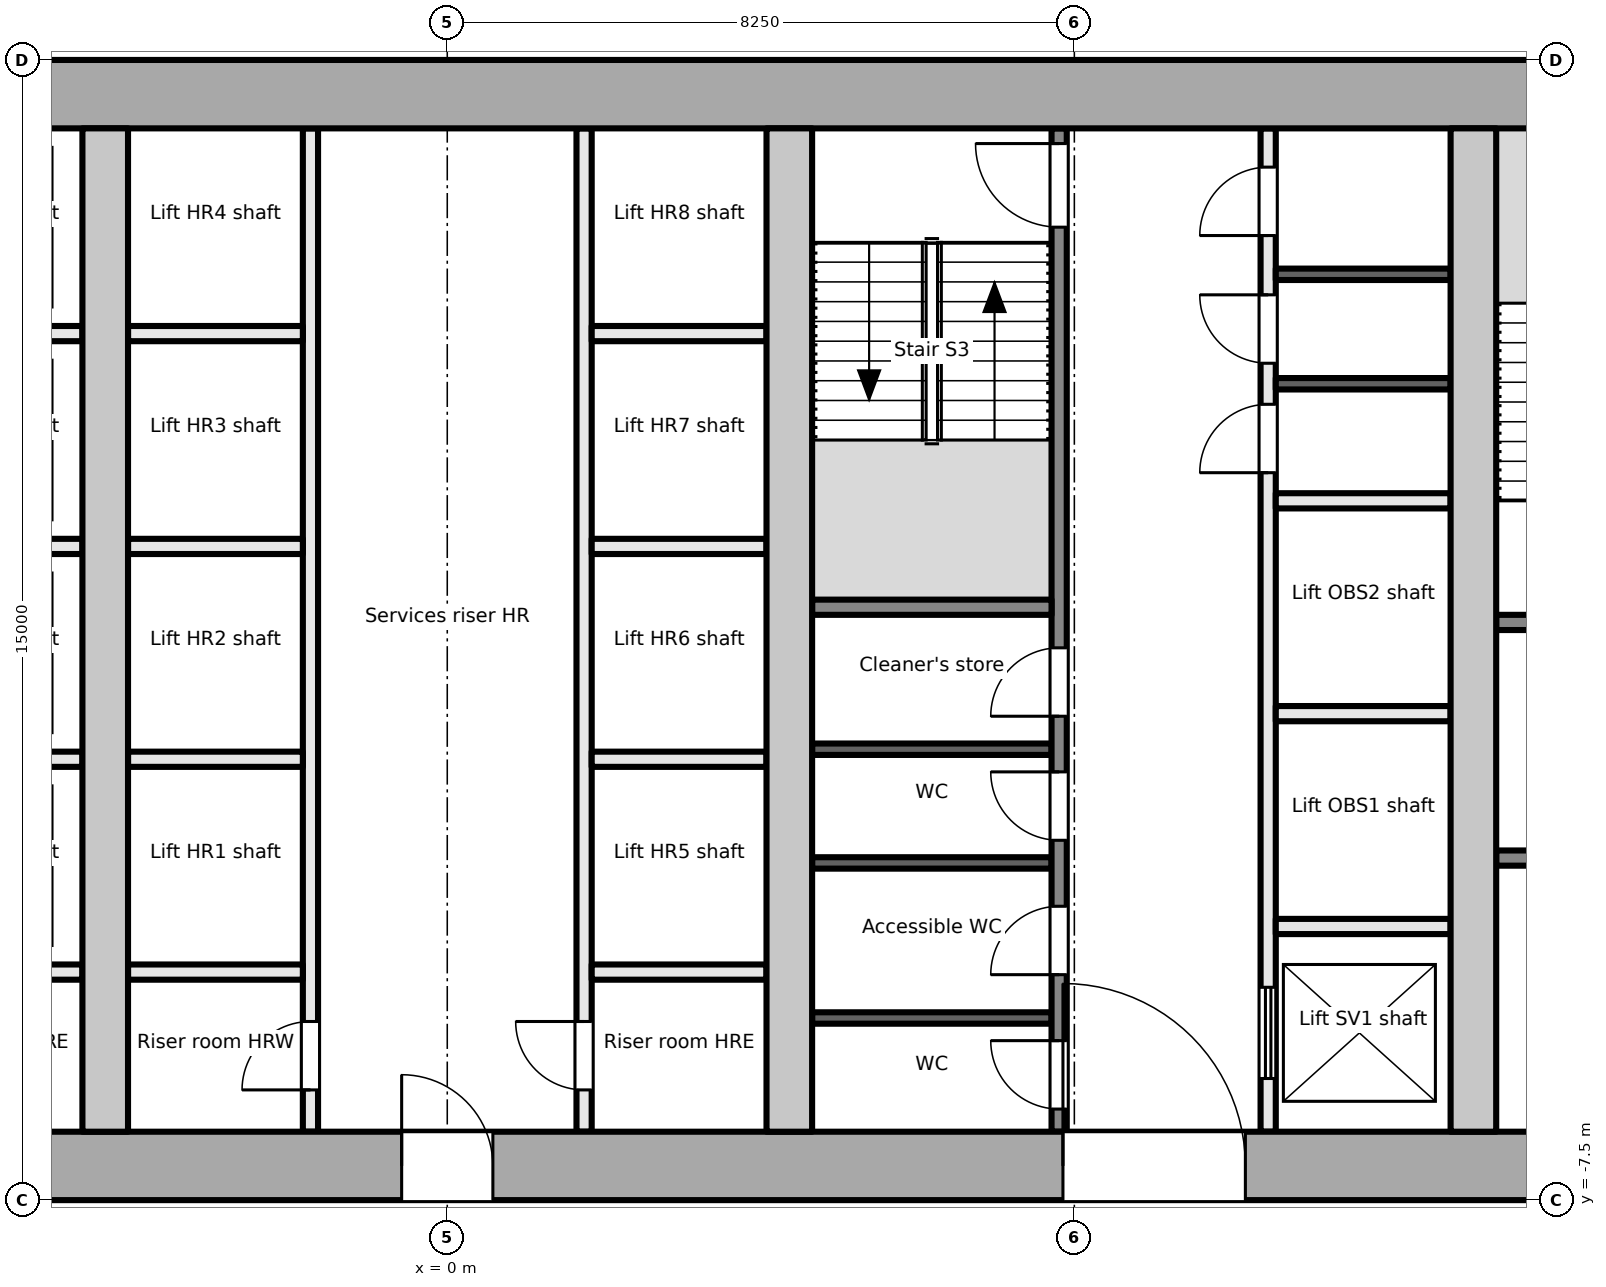
"""IFC4 building model, lengths in metres.
Left out: names, types, materials, properties, quantities, classifications, styles, units other than length and angle.
Written with IfcOpenShell. Run it as: python <this file> out.ifc"""

import sys

from ifc_helpers import new_model, si_unit, direction, frame, frame_2d, origin, place, context, subcontext, project, spatial, rectangle, extrude, element, fill, save


model = new_model("IFC4")
c1 = context("Model", 3, precision=1e-05, world=origin(), true_north=direction((0.0, 1.0)))
c2 = subcontext(c1, "Body", "Model", "MODEL_VIEW")
j1 = project(units=[si_unit("LENGTHUNIT", "METRE"), si_unit("PLANEANGLEUNIT", "RADIAN")], contexts=[c1])
p1 = place(None, origin())
s1 = spatial("IfcSite", under=j1, at=p1, CompositionType="ELEMENT")
p2 = place(p1, origin())
s2 = spatial("IfcBuilding", under=s1, at=p2, CompositionType="ELEMENT")
p3 = place(p2, frame((0.0, 0.0, 65.2)))
s3 = spatial("IfcBuildingStorey", under=s2, at=p3, CompositionType="ELEMENT", Elevation=65.2)
p4 = place(p3, frame((-18.0, -7.05, -0.2), z_axis=(0.0, 0.0, 1.0), x_axis=(1.0, 0.0, 0.0)))
e1 = element("IfcWall", 1, at=p4, inside=s3, PredefinedType="SHEAR", context=c2, shape_type="SweptSolid", body=[
    extrude(rectangle(XDim=36.0, YDim=0.9, at=frame_2d((18.0, 0.0))), origin(), (0.0, 0.0, 1.0), 4.1),
])
p5 = place(p4, frame((7.8, 0.0, 0.2)))
e2 = element("IfcOpeningElement", 2, at=p5, cuts=e1, PredefinedType="OPENING", context=c2, shape_type="SweptSolid", body=[
    extrude(rectangle(XDim=2.4, YDim=2.1, at=frame_2d((1.2, 1.05))), frame((0.0, 0.46, 0.0), z_axis=(0.0, -1.0, 0.0), x_axis=(1.0, 0.0, 0.0)), (0.0, 0.0, 1.0), 0.921),
])
p6 = place(p4, frame((17.4, 0.0, 0.2)))
e3 = element("IfcOpeningElement", 3, at=p6, cuts=e1, PredefinedType="OPENING", context=c2, shape_type="SweptSolid", body=[
    extrude(rectangle(XDim=1.2, YDim=2.1, at=frame_2d((0.6, 1.05))), frame((0.0, 0.46, 0.0), z_axis=(0.0, -1.0, 0.0), x_axis=(1.0, 0.0, 0.0)), (0.0, 0.0, 1.0), 0.921),
])
p7 = place(p4, frame((26.1, 0.0, 0.2)))
e4 = element("IfcOpeningElement", 4, at=p7, cuts=e1, PredefinedType="OPENING", context=c2, shape_type="SweptSolid", body=[
    extrude(rectangle(XDim=2.4, YDim=2.1, at=frame_2d((1.2, 1.05))), frame((0.0, 0.46, 0.0), z_axis=(0.0, -1.0, 0.0), x_axis=(1.0, 0.0, 0.0)), (0.0, 0.0, 1.0), 0.921),
])
p8 = place(p3, frame((-18.0, 7.05, -0.2), z_axis=(0.0, 0.0, 1.0), x_axis=(1.0, 0.0, 0.0)))
e5 = element("IfcWall", 5, at=p8, inside=s3, PredefinedType="SHEAR", context=c2, shape_type="SweptSolid", body=[
    extrude(rectangle(XDim=36.0, YDim=0.9, at=frame_2d((18.0, 0.0))), origin(), (0.0, 0.0, 1.0), 4.1),
])
for number, where, z_axis, x_axis in (
    (6, (-4.5, -6.6, -0.2), (0.0, 0.0, 1.0), (0.0, 1.0, 0.0)),
    (7, (4.5, -6.6, -0.2), (0.0, 0.0, 1.0), (0.0, 1.0, 0.0)),
    (8, (13.5, -6.6, -0.2), (0.0, 0.0, 1.0), (0.0, 1.0, 0.0)),
):
    element("IfcWall", number, at=place(p3, frame(where, z_axis=z_axis, x_axis=x_axis)), inside=s3, PredefinedType="SHEAR", context=c2, shape_type="SweptSolid", body=[
        extrude(rectangle(XDim=13.2, YDim=0.6, at=frame_2d((6.6, 0.0))), origin(), (0.0, 0.0, 1.0), 4.1),
    ])
p9 = place(p3, frame((13.8, -3.0, 0.0), z_axis=(0.0, 0.0, 1.0), x_axis=(1.0, 0.0, 0.0)))
e9 = element("IfcWall", 9, at=p9, inside=s3, PredefinedType="PARTITIONING", context=c2, shape_type="SweptSolid", body=[
    extrude(rectangle(XDim=3.3, YDim=0.2, at=frame_2d((1.65, 0.0))), origin(), (0.0, 0.0, 1.0), 3.9),
])
p10 = place(p9, frame((1.1, 0.0, 0.0)))
e10 = element("IfcOpeningElement", 10, at=p10, cuts=e9, PredefinedType="OPENING", context=c2, shape_type="SweptSolid", body=[
    extrude(rectangle(XDim=1.1, YDim=2.1, at=frame_2d((0.55, 1.05))), frame((0.0, 0.111, 0.0), z_axis=(0.0, -1.0, 0.0), x_axis=(1.0, 0.0, 0.0)), (0.0, 0.0, 1.0), 0.221),
])
p11 = place(p3, frame((13.8, 0.1, 0.0), z_axis=(0.0, 0.0, 1.0), x_axis=(1.0, 0.0, 0.0)))
e11 = element("IfcWall", 11, at=p11, inside=s3, PredefinedType="PARTITIONING", context=c2, shape_type="SweptSolid", body=[
    extrude(rectangle(XDim=3.3, YDim=0.2, at=frame_2d((1.65, 0.0))), origin(), (0.0, 0.0, 1.0), 3.9),
])
p12 = place(p11, frame((1.1, 0.0, 0.0)))
e12 = element("IfcOpeningElement", 12, at=p12, cuts=e11, PredefinedType="OPENING", context=c2, shape_type="SweptSolid", body=[
    extrude(rectangle(XDim=1.1, YDim=2.1, at=frame_2d((0.55, 1.05))), frame((0.0, 0.111, 0.0), z_axis=(0.0, -1.0, 0.0), x_axis=(1.0, 0.0, 0.0)), (0.0, 0.0, 1.0), 0.221),
])
for number, where, z_axis, x_axis in (
    (13, (-7.1, -1.7, 0.0), (0.0, 0.0, 1.0), (1.0, 0.0, 0.0)),
    (14, (-7.1, 1.1, 0.0), (0.0, 0.0, 1.0), (1.0, 0.0, 0.0)),
    (15, (-7.1, 3.9, 0.0), (0.0, 0.0, 1.0), (1.0, 0.0, 0.0)),
    (16, (-7.1, -4.5, 0.0), (0.0, 0.0, 1.0), (1.0, 0.0, 0.0)),
):
    element("IfcWall", number, at=place(p3, frame(where, z_axis=z_axis, x_axis=x_axis)), inside=s3, PredefinedType="PARTITIONING", context=c2, shape_type="SweptSolid", body=[
        extrude(rectangle(XDim=2.3, YDim=0.2, at=frame_2d((1.15, 0.0))), origin(), (0.0, 0.0, 1.0), 3.9),
    ])
p13 = place(p3, frame((-1.8, -6.6, 0.0), z_axis=(0.0, 0.0, 1.0), x_axis=(0.0, 1.0, 0.0)))
e17 = element("IfcWall", 17, at=p13, inside=s3, PredefinedType="PARTITIONING", context=c2, shape_type="SweptSolid", body=[
    extrude(rectangle(XDim=13.2, YDim=0.2, at=frame_2d((6.6, 0.0))), origin(), (0.0, 0.0, 1.0), 3.9),
])
p14 = place(p13, frame((0.55, 0.0, 0.0)))
e18 = element("IfcOpeningElement", 18, at=p14, cuts=e17, PredefinedType="OPENING", context=c2, shape_type="SweptSolid", body=[
    extrude(rectangle(XDim=0.9, YDim=2.1, at=frame_2d((0.45, 1.05))), frame((0.0, 0.111, 0.0), z_axis=(0.0, -1.0, 0.0), x_axis=(1.0, 0.0, 0.0)), (0.0, 0.0, 1.0), 0.221),
])
p15 = place(p3, frame((1.8, -6.6, 0.0), z_axis=(0.0, 0.0, 1.0), x_axis=(0.0, 1.0, 0.0)))
e19 = element("IfcWall", 19, at=p15, inside=s3, PredefinedType="PARTITIONING", context=c2, shape_type="SweptSolid", body=[
    extrude(rectangle(XDim=13.2, YDim=0.2, at=frame_2d((6.6, 0.0))), origin(), (0.0, 0.0, 1.0), 3.9),
])
p16 = place(p15, frame((0.55, 0.0, 0.0)))
e20 = element("IfcOpeningElement", 20, at=p16, cuts=e19, PredefinedType="OPENING", context=c2, shape_type="SweptSolid", body=[
    extrude(rectangle(XDim=0.9, YDim=2.1, at=frame_2d((0.45, 1.05))), frame((0.0, 0.111, 0.0), z_axis=(0.0, -1.0, 0.0), x_axis=(1.0, 0.0, 0.0)), (0.0, 0.0, 1.0), 0.221),
])
for number, where, z_axis, x_axis in (
    (21, (-4.2, -1.7, 0.0), (0.0, 0.0, 1.0), (1.0, 0.0, 0.0)),
    (22, (-4.2, 1.1, 0.0), (0.0, 0.0, 1.0), (1.0, 0.0, 0.0)),
    (23, (-4.2, 3.9, 0.0), (0.0, 0.0, 1.0), (1.0, 0.0, 0.0)),
    (24, (-4.2, -4.5, 0.0), (0.0, 0.0, 1.0), (1.0, 0.0, 0.0)),
    (25, (1.9, -1.7, 0.0), (0.0, 0.0, 1.0), (1.0, 0.0, 0.0)),
    (26, (1.9, 1.1, 0.0), (0.0, 0.0, 1.0), (1.0, 0.0, 0.0)),
    (27, (1.9, 3.9, 0.0), (0.0, 0.0, 1.0), (1.0, 0.0, 0.0)),
    (28, (1.9, -4.5, 0.0), (0.0, 0.0, 1.0), (1.0, 0.0, 0.0)),
):
    element("IfcWall", number, at=place(p3, frame(where, z_axis=z_axis, x_axis=x_axis)), inside=s3, PredefinedType="PARTITIONING", context=c2, shape_type="SweptSolid", body=[
        extrude(rectangle(XDim=2.3, YDim=0.2, at=frame_2d((1.15, 0.0))), origin(), (0.0, 0.0, 1.0), 3.9),
    ])
p17 = place(p3, frame((8.05, -6.6, 0.0), z_axis=(0.0, 0.0, 1.0), x_axis=(0.0, 1.0, 0.0)))
e29 = element("IfcWall", 29, at=p17, inside=s3, PredefinedType="PARTITIONING", context=c2, shape_type="SweptSolid", body=[
    extrude(rectangle(XDim=13.2, YDim=0.2, at=frame_2d((6.6, 0.0))), origin(), (0.0, 0.0, 1.0), 3.9),
])
p18 = place(p17, frame((0.298, 0.0, 0.0)))
e30 = element("IfcOpeningElement", 30, at=p18, cuts=e29, PredefinedType="OPENING", context=c2, shape_type="SweptSolid", body=[
    extrude(rectangle(XDim=0.9, YDim=2.1, at=frame_2d((0.45, 1.05))), frame((0.0, 0.111, 0.0), z_axis=(0.0, -1.0, 0.0), x_axis=(1.0, 0.0, 0.0)), (0.0, 0.0, 1.0), 0.221),
])
p19 = place(p17, frame((2.066, 0.0, 0.0)))
e31 = element("IfcOpeningElement", 31, at=p19, cuts=e29, PredefinedType="OPENING", context=c2, shape_type="SweptSolid", body=[
    extrude(rectangle(XDim=0.9, YDim=2.1, at=frame_2d((0.45, 1.05))), frame((0.0, 0.111, 0.0), z_axis=(0.0, -1.0, 0.0), x_axis=(1.0, 0.0, 0.0)), (0.0, 0.0, 1.0), 0.221),
])
p20 = place(p17, frame((3.834, 0.0, 0.0)))
e32 = element("IfcOpeningElement", 32, at=p20, cuts=e29, PredefinedType="OPENING", context=c2, shape_type="SweptSolid", body=[
    extrude(rectangle(XDim=0.9, YDim=2.1, at=frame_2d((0.45, 1.05))), frame((0.0, 0.111, 0.0), z_axis=(0.0, -1.0, 0.0), x_axis=(1.0, 0.0, 0.0)), (0.0, 0.0, 1.0), 0.221),
])
p21 = place(p17, frame((5.466, 0.0, 0.0)))
e33 = element("IfcOpeningElement", 33, at=p21, cuts=e29, PredefinedType="OPENING", context=c2, shape_type="SweptSolid", body=[
    extrude(rectangle(XDim=0.9, YDim=2.1, at=frame_2d((0.45, 1.05))), frame((0.0, 0.111, 0.0), z_axis=(0.0, -1.0, 0.0), x_axis=(1.0, 0.0, 0.0)), (0.0, 0.0, 1.0), 0.221),
])
p22 = place(p17, frame((11.9, 0.0, 0.0)))
e34 = element("IfcOpeningElement", 34, at=p22, cuts=e29, PredefinedType="OPENING", context=c2, shape_type="SweptSolid", body=[
    extrude(rectangle(XDim=1.1, YDim=2.1, at=frame_2d((0.55, 1.05))), frame((0.0, 0.111, 0.0), z_axis=(0.0, -1.0, 0.0), x_axis=(1.0, 0.0, 0.0)), (0.0, 0.0, 1.0), 0.221),
])
p23 = place(p3, frame((10.8, -6.6, 0.0), z_axis=(0.0, 0.0, 1.0), x_axis=(0.0, 1.0, 0.0)))
e35 = element("IfcWall", 35, at=p23, inside=s3, PredefinedType="PARTITIONING", context=c2, shape_type="SweptSolid", body=[
    extrude(rectangle(XDim=13.2, YDim=0.2, at=frame_2d((6.6, 0.0))), origin(), (0.0, 0.0, 1.0), 3.9),
])
p24 = place(p23, frame((0.7, 0.0, 0.0)))
e36 = element("IfcOpeningElement", 36, at=p24, cuts=e35, PredefinedType="OPENING", context=c2, shape_type="SweptSolid", body=[
    extrude(rectangle(XDim=1.2, YDim=2.1, at=frame_2d((0.6, 1.05))), frame((0.0, 0.111, 0.0), z_axis=(0.0, -1.0, 0.0), x_axis=(1.0, 0.0, 0.0)), (0.0, 0.0, 1.0), 0.221),
])
p25 = place(p23, frame((8.67, 0.0, 0.0)))
e37 = element("IfcOpeningElement", 37, at=p25, cuts=e35, PredefinedType="OPENING", context=c2, shape_type="SweptSolid", body=[
    extrude(rectangle(XDim=0.9, YDim=2.1, at=frame_2d((0.45, 1.05))), frame((0.0, 0.111, 0.0), z_axis=(0.0, -1.0, 0.0), x_axis=(1.0, 0.0, 0.0)), (0.0, 0.0, 1.0), 0.221),
])
p26 = place(p23, frame((10.11, 0.0, 0.0)))
e38 = element("IfcOpeningElement", 38, at=p26, cuts=e35, PredefinedType="OPENING", context=c2, shape_type="SweptSolid", body=[
    extrude(rectangle(XDim=0.9, YDim=2.1, at=frame_2d((0.45, 1.05))), frame((0.0, 0.111, 0.0), z_axis=(0.0, -1.0, 0.0), x_axis=(1.0, 0.0, 0.0)), (0.0, 0.0, 1.0), 0.221),
])
p27 = place(p23, frame((11.79, 0.0, 0.0)))
e39 = element("IfcOpeningElement", 39, at=p27, cuts=e35, PredefinedType="OPENING", context=c2, shape_type="SweptSolid", body=[
    extrude(rectangle(XDim=0.9, YDim=2.1, at=frame_2d((0.45, 1.05))), frame((0.0, 0.111, 0.0), z_axis=(0.0, -1.0, 0.0), x_axis=(1.0, 0.0, 0.0)), (0.0, 0.0, 1.0), 0.221),
])
p28 = place(p3, frame((4.8, 0.3, 0.0), z_axis=(0.0, 0.0, 1.0), x_axis=(1.0, 0.0, 0.0)))
e40 = element("IfcWall", 40, at=p28, inside=s3, PredefinedType="PARTITIONING", context=c2, shape_type="SweptSolid", body=[
    extrude(rectangle(XDim=3.15, YDim=0.2, at=frame_2d((1.575, 0.0))), origin(), (0.0, 0.0, 1.0), 3.9),
])
for number, where, z_axis, x_axis in (
    (41, (4.8, -5.104, 0.0), (0.0, 0.0, 1.0), (1.0, 0.0, 0.0)),
    (42, (4.8, -3.064, 0.0), (0.0, 0.0, 1.0), (1.0, 0.0, 0.0)),
    (43, (4.8, -1.568, 0.0), (0.0, 0.0, 1.0), (1.0, 0.0, 0.0)),
):
    element("IfcWall", number, at=place(p3, frame(where, z_axis=z_axis, x_axis=x_axis)), inside=s3, PredefinedType="PARTITIONING", context=c2, shape_type="SweptSolid", body=[
        extrude(rectangle(XDim=3.15, YDim=0.15, at=frame_2d((1.575, 0.0))), origin(), (0.0, 0.0, 1.0), 3.9),
    ])
for number, where, z_axis, x_axis in (
    (44, (10.9, -3.9, 0.0), (0.0, 0.0, 1.0), (1.0, 0.0, 0.0)),
    (45, (10.9, -1.1, 0.0), (0.0, 0.0, 1.0), (1.0, 0.0, 0.0)),
    (46, (10.9, 1.7, 0.0), (0.0, 0.0, 1.0), (1.0, 0.0, 0.0)),
):
    element("IfcWall", number, at=place(p3, frame(where, z_axis=z_axis, x_axis=x_axis)), inside=s3, PredefinedType="PARTITIONING", context=c2, shape_type="SweptSolid", body=[
        extrude(rectangle(XDim=2.3, YDim=0.2, at=frame_2d((1.15, 0.0))), origin(), (0.0, 0.0, 1.0), 3.9),
    ])
for number, where, z_axis, x_axis in (
    (47, (10.9, 3.24, 0.0), (0.0, 0.0, 1.0), (1.0, 0.0, 0.0)),
    (48, (10.9, 4.68, 0.0), (0.0, 0.0, 1.0), (1.0, 0.0, 0.0)),
):
    element("IfcWall", number, at=place(p3, frame(where, z_axis=z_axis, x_axis=x_axis)), inside=s3, PredefinedType="PARTITIONING", context=c2, shape_type="SweptSolid", body=[
        extrude(rectangle(XDim=2.3, YDim=0.15, at=frame_2d((1.15, 0.0))), origin(), (0.0, 0.0, 1.0), 3.9),
    ])
p29 = place(p14, origin())
e49 = element("IfcDoor", 49, at=p29, inside=s3, OperationType="SINGLE_SWING_LEFT", PredefinedType="DOOR", context=c2, shape_type="SweptSolid", body=[
    extrude(rectangle(XDim=0.9, YDim=2.1, at=frame_2d((0.45, 1.05))), frame((0.0, 0.025, 0.0), z_axis=(0.0, -1.0, 0.0), x_axis=(1.0, 0.0, 0.0)), (0.0, 0.0, 1.0), 0.05),
])
fill(e18, e49)
p30 = place(p16, origin())
e50 = element("IfcDoor", 50, at=p30, inside=s3, OperationType="SINGLE_SWING_RIGHT", PredefinedType="DOOR", context=c2, shape_type="SweptSolid", body=[
    extrude(rectangle(XDim=0.9, YDim=2.1, at=frame_2d((0.45, 1.05))), frame((0.0, 0.025, 0.0), z_axis=(0.0, -1.0, 0.0), x_axis=(1.0, 0.0, 0.0)), (0.0, 0.0, 1.0), 0.05),
])
fill(e20, e50)
p31 = place(p6, origin())
e51 = element("IfcDoor", 51, at=p31, inside=s3, OperationType="SINGLE_SWING_LEFT", PredefinedType="DOOR", context=c2, shape_type="SweptSolid", body=[
    extrude(rectangle(XDim=1.2, YDim=2.1, at=frame_2d((0.6, 1.05))), frame((0.0, 0.025, 0.0), z_axis=(0.0, -1.0, 0.0), x_axis=(1.0, 0.0, 0.0)), (0.0, 0.0, 1.0), 0.05),
])
fill(e3, e51)
p32 = place(p18, origin())
e52 = element("IfcDoor", 52, at=p32, inside=s3, OperationType="SINGLE_SWING_RIGHT", PredefinedType="DOOR", context=c2, shape_type="SweptSolid", body=[
    extrude(rectangle(XDim=0.9, YDim=2.1, at=frame_2d((0.45, 1.05))), frame((0.0, 0.025, 0.0), z_axis=(0.0, -1.0, 0.0), x_axis=(1.0, 0.0, 0.0)), (0.0, 0.0, 1.0), 0.05),
])
fill(e30, e52)
p33 = place(p19, origin())
e53 = element("IfcDoor", 53, at=p33, inside=s3, OperationType="SINGLE_SWING_LEFT", PredefinedType="DOOR", context=c2, shape_type="SweptSolid", body=[
    extrude(rectangle(XDim=0.9, YDim=2.1, at=frame_2d((0.45, 1.05))), frame((0.0, 0.025, 0.0), z_axis=(0.0, -1.0, 0.0), x_axis=(1.0, 0.0, 0.0)), (0.0, 0.0, 1.0), 0.05),
])
fill(e31, e53)
p34 = place(p20, origin())
e54 = element("IfcDoor", 54, at=p34, inside=s3, OperationType="SINGLE_SWING_RIGHT", PredefinedType="DOOR", context=c2, shape_type="SweptSolid", body=[
    extrude(rectangle(XDim=0.9, YDim=2.1, at=frame_2d((0.45, 1.05))), frame((0.0, 0.025, 0.0), z_axis=(0.0, -1.0, 0.0), x_axis=(1.0, 0.0, 0.0)), (0.0, 0.0, 1.0), 0.05),
])
fill(e32, e54)
p35 = place(p21, origin())
e55 = element("IfcDoor", 55, at=p35, inside=s3, OperationType="SINGLE_SWING_LEFT", PredefinedType="DOOR", context=c2, shape_type="SweptSolid", body=[
    extrude(rectangle(XDim=0.9, YDim=2.1, at=frame_2d((0.45, 1.05))), frame((0.0, 0.025, 0.0), z_axis=(0.0, -1.0, 0.0), x_axis=(1.0, 0.0, 0.0)), (0.0, 0.0, 1.0), 0.05),
])
fill(e33, e55)
p36 = place(p22, origin())
e56 = element("IfcDoor", 56, at=p36, inside=s3, OperationType="SINGLE_SWING_RIGHT", PredefinedType="DOOR", context=c2, shape_type="SweptSolid", body=[
    extrude(rectangle(XDim=1.1, YDim=2.1, at=frame_2d((0.55, 1.05))), frame((0.0, 0.025, 0.0), z_axis=(0.0, -1.0, 0.0), x_axis=(1.0, 0.0, 0.0)), (0.0, 0.0, 1.0), 0.05),
])
fill(e34, e56)
p37 = place(p7, origin())
e57 = element("IfcDoor", 57, at=p37, inside=s3, OperationType="DOUBLE_DOOR_DOUBLE_SWING", PredefinedType="DOOR", context=c2, shape_type="SweptSolid", body=[
    extrude(rectangle(XDim=2.4, YDim=2.1, at=frame_2d((1.2, 1.05))), frame((0.0, 0.025, 0.0), z_axis=(0.0, -1.0, 0.0), x_axis=(1.0, 0.0, 0.0)), (0.0, 0.0, 1.0), 0.05),
])
fill(e4, e57)
p38 = place(p24, origin())
e58 = element("IfcDoor", 58, at=p38, inside=s3, OperationType="DOUBLE_DOOR_SLIDING", PredefinedType="DOOR", context=c2, shape_type="SweptSolid", body=[
    extrude(rectangle(XDim=1.2, YDim=2.1, at=frame_2d((0.6, 1.05))), frame((0.0, 0.025, 0.0), z_axis=(0.0, -1.0, 0.0), x_axis=(1.0, 0.0, 0.0)), (0.0, 0.0, 1.0), 0.05),
])
fill(e36, e58)
p39 = place(p25, origin())
e59 = element("IfcDoor", 59, at=p39, inside=s3, OperationType="SINGLE_SWING_LEFT", PredefinedType="DOOR", context=c2, shape_type="SweptSolid", body=[
    extrude(rectangle(XDim=0.9, YDim=2.1, at=frame_2d((0.45, 1.05))), frame((0.0, 0.025, 0.0), z_axis=(0.0, -1.0, 0.0), x_axis=(1.0, 0.0, 0.0)), (0.0, 0.0, 1.0), 0.05),
])
fill(e37, e59)
p40 = place(p26, origin())
e60 = element("IfcDoor", 60, at=p40, inside=s3, OperationType="SINGLE_SWING_RIGHT", PredefinedType="DOOR", context=c2, shape_type="SweptSolid", body=[
    extrude(rectangle(XDim=0.9, YDim=2.1, at=frame_2d((0.45, 1.05))), frame((0.0, 0.025, 0.0), z_axis=(0.0, -1.0, 0.0), x_axis=(1.0, 0.0, 0.0)), (0.0, 0.0, 1.0), 0.05),
])
fill(e38, e60)
p41 = place(p27, origin())
e61 = element("IfcDoor", 61, at=p41, inside=s3, OperationType="SINGLE_SWING_LEFT", PredefinedType="DOOR", context=c2, shape_type="SweptSolid", body=[
    extrude(rectangle(XDim=0.9, YDim=2.1, at=frame_2d((0.45, 1.05))), frame((0.0, 0.025, 0.0), z_axis=(0.0, -1.0, 0.0), x_axis=(1.0, 0.0, 0.0)), (0.0, 0.0, 1.0), 0.05),
])
fill(e39, e61)
save(model, sys.argv[1])
